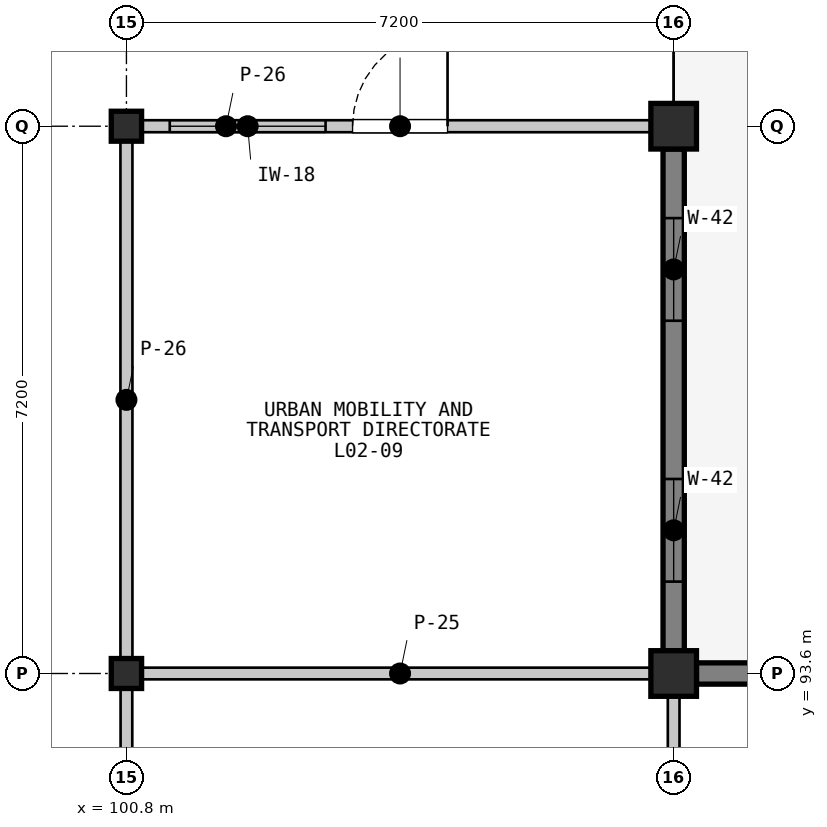
"""IFC4 building model, lengths in metres.
Left out: names, types, materials, properties, quantities, classifications, styles, units other than length and angle.
Written with IfcOpenShell. Run it as: python <this file> out.ifc"""

import sys

from ifc_helpers import new_model, si_unit, direction, frame, frame_2d, origin, origin_2d, place, context, subcontext, project, spatial, rectangle, i_section, extrude, element, fill, save


model = new_model("IFC4")
c1 = context("Model", 3, precision=1e-05, world=origin(), true_north=direction((0.0, 1.0)))
c2 = subcontext(c1, "Body", "Model", "MODEL_VIEW")
j1 = project(units=[si_unit("LENGTHUNIT", "METRE"), si_unit("PLANEANGLEUNIT", "RADIAN")], contexts=[c1])
p1 = place(None, origin())
s1 = spatial("IfcSite", under=j1, at=p1, CompositionType="ELEMENT")
p2 = place(p1, origin())
s2 = spatial("IfcBuilding", under=s1, at=p2, CompositionType="ELEMENT")
p3 = place(p2, frame((0.0, 0.0, 5.4)))
s3 = spatial("IfcBuildingStorey", under=s2, at=p3, CompositionType="ELEMENT", Elevation=5.4)
for number, where, z_axis, x_axis in (
    (1, (100.8, 93.6, 0.0), (0.0, 0.0, 1.0), (1.0, 0.0, 0.0)),
    (2, (100.8, 100.8, 0.0), (0.0, 0.0, 1.0), (1.0, 0.0, 0.0)),
):
    element("IfcColumn", number, at=place(p3, frame(where, z_axis=z_axis, x_axis=x_axis)), inside=s3, PredefinedType="COLUMN", context=c2, shape_type="SweptSolid", body=[
        extrude(i_section(OverallWidth=0.399, OverallDepth=0.394, WebThickness=0.023, FlangeThickness=0.037, FilletRadius=0.015, at=origin_2d()), origin(), (0.0, 0.0, 1.0), 4.5),
    ])
for number, where, z_axis, x_axis in (
    (3, (108.0, 93.6, 0.0), (0.0, 0.0, 1.0), (1.0, 0.0, 0.0)),
    (4, (108.0, 100.8, 0.0), (0.0, 0.0, 1.0), (1.0, 0.0, 0.0)),
):
    element("IfcColumn", number, at=place(p3, frame(where, z_axis=z_axis, x_axis=x_axis)), inside=s3, PredefinedType="COLUMN", context=c2, shape_type="SweptSolid", body=[
        extrude(rectangle(XDim=0.6, YDim=0.6, at=origin_2d()), origin(), (0.0, 0.0, 1.0), 4.5),
    ])
p4 = place(p3, frame((108.0, 100.5, 0.0), z_axis=(0.0, 0.0, 1.0), x_axis=(0.0, -1.0, 0.0)))
e5 = element("IfcWall", 5, at=p4, inside=s3, PredefinedType="SOLIDWALL", context=c2, shape_type="SweptSolid", body=[
    extrude(rectangle(XDim=6.6, YDim=0.28, at=frame_2d((3.3, 0.0))), origin(), (0.0, 0.0, 1.0), 3.767),
])
p5 = place(p4, frame((0.909, 0.0, 0.95)))
e6 = element("IfcOpeningElement", 6, at=p5, cuts=e5, PredefinedType="OPENING", context=c2, shape_type="SweptSolid", body=[
    extrude(rectangle(XDim=1.35, YDim=1.85, at=frame_2d((0.675, 0.925))), frame((0.0, 0.15, 0.0), z_axis=(0.0, -1.0, 0.0), x_axis=(1.0, 0.0, 0.0)), (0.0, 0.0, 1.0), 0.3),
])
p6 = place(p4, frame((4.341, 0.0, 0.95)))
e7 = element("IfcOpeningElement", 7, at=p6, cuts=e5, PredefinedType="OPENING", context=c2, shape_type="SweptSolid", body=[
    extrude(rectangle(XDim=1.35, YDim=1.85, at=frame_2d((0.675, 0.925))), frame((0.0, 0.15, 0.0), z_axis=(0.0, -1.0, 0.0), x_axis=(1.0, 0.0, 0.0)), (0.0, 0.0, 1.0), 0.3),
])
p7 = place(p3, frame((108.3, 93.6, 0.0), z_axis=(0.0, 0.0, 1.0), x_axis=(1.0, 0.0, 0.0)))
e8 = element("IfcWall", 8, at=p7, inside=s3, PredefinedType="SOLIDWALL", context=c2, shape_type="SweptSolid", body=[
    extrude(rectangle(XDim=6.65, YDim=0.28, at=frame_2d((3.325, 0.0))), origin(), (0.0, 0.0, 1.0), 3.698),
])
for number, where, z_axis, x_axis in (
    (9, (100.92, 93.6, 0.0), (0.0, 0.0, 1.0), (1.0, 0.0, 0.0)),
    (10, (100.8, 86.52, 0.0), (0.0, 0.0, 1.0), (0.0, 1.0, 0.0)),
    (11, (108.0, 93.48, 0.0), (0.0, 0.0, 1.0), (0.0, -1.0, 0.0)),
):
    element("IfcWall", number, at=place(p3, frame(where, z_axis=z_axis, x_axis=x_axis)), inside=s3, PredefinedType="PARTITIONING", context=c2, shape_type="SweptSolid", body=[
        extrude(rectangle(XDim=6.96, YDim=0.154, at=frame_2d((3.48, 0.0))), origin(), (0.0, 0.0, 1.0), 3.688),
    ])
p8 = place(p3, frame((100.92, 100.8, 0.0), z_axis=(0.0, 0.0, 1.0), x_axis=(1.0, 0.0, 0.0)))
e12 = element("IfcWall", 12, at=p8, inside=s3, PredefinedType="PARTITIONING", context=c2, shape_type="SweptSolid", body=[
    extrude(rectangle(XDim=6.96, YDim=0.158, at=frame_2d((3.48, 0.0))), origin(), (0.0, 0.0, 1.0), 3.688),
])
p9 = place(p8, frame((2.855, 0.0, 0.0)))
e13 = element("IfcOpeningElement", 13, at=p9, cuts=e12, PredefinedType="OPENING", context=c2, shape_type="SweptSolid", body=[
    extrude(rectangle(XDim=1.25, YDim=2.2, at=frame_2d((0.625, 1.1))), frame((0.0, 0.089, 0.0), z_axis=(0.0, -1.0, 0.0), x_axis=(1.0, 0.0, 0.0)), (0.0, 0.0, 1.0), 0.178),
])
p10 = place(p8, frame((0.45, 0.0, 1.05)))
e14 = element("IfcOpeningElement", 14, at=p10, cuts=e12, PredefinedType="OPENING", context=c2, shape_type="SweptSolid", body=[
    extrude(rectangle(XDim=2.05, YDim=1.22, at=frame_2d((1.025, 0.61))), frame((0.0, 0.089, 0.0), z_axis=(0.0, -1.0, 0.0), x_axis=(1.0, 0.0, 0.0)), (0.0, 0.0, 1.0), 0.178),
])
p11 = place(p3, frame((100.8, 93.72, 0.0), z_axis=(0.0, 0.0, 1.0), x_axis=(0.0, 1.0, 0.0)))
e15 = element("IfcWall", 15, at=p11, inside=s3, PredefinedType="PARTITIONING", context=c2, shape_type="SweptSolid", body=[
    extrude(rectangle(XDim=6.96, YDim=0.158, at=frame_2d((3.48, 0.0))), origin(), (0.0, 0.0, 1.0), 3.688),
])
p12 = place(p5, origin())
e16 = element("IfcWindow", 16, at=p12, inside=s3, PartitioningType="SINGLE_PANEL", PredefinedType="WINDOW", context=c2, shape_type="SweptSolid", body=[
    extrude(rectangle(XDim=1.35, YDim=1.85, at=frame_2d((0.675, 0.925))), frame((0.0, 0.03, 0.0), z_axis=(0.0, -1.0, 0.0), x_axis=(1.0, 0.0, 0.0)), (0.0, 0.0, 1.0), 0.06),
])
fill(e6, e16)
p13 = place(p6, origin())
e17 = element("IfcWindow", 17, at=p13, inside=s3, PartitioningType="SINGLE_PANEL", PredefinedType="WINDOW", context=c2, shape_type="SweptSolid", body=[
    extrude(rectangle(XDim=1.35, YDim=1.85, at=frame_2d((0.675, 0.925))), frame((0.0, 0.03, 0.0), z_axis=(0.0, -1.0, 0.0), x_axis=(1.0, 0.0, 0.0)), (0.0, 0.0, 1.0), 0.06),
])
fill(e7, e17)
p14 = place(p9, origin())
e18 = element("IfcDoor", 18, at=p14, inside=s3, OperationType="SINGLE_SWING_RIGHT", PredefinedType="DOOR", context=c2, shape_type="SweptSolid", body=[
    extrude(rectangle(XDim=1.25, YDim=2.2, at=frame_2d((0.625, 1.1))), frame((0.0, 0.025, 0.0), z_axis=(0.0, -1.0, 0.0), x_axis=(1.0, 0.0, 0.0)), (0.0, 0.0, 1.0), 0.05),
])
fill(e13, e18)
p15 = place(p10, origin())
e19 = element("IfcWindow", 19, at=p15, inside=s3, PartitioningType="SINGLE_PANEL", PredefinedType="WINDOW", context=c2, shape_type="SweptSolid", body=[
    extrude(rectangle(XDim=2.05, YDim=1.22, at=frame_2d((1.025, 0.61))), frame((0.0, 0.03, 0.0), z_axis=(0.0, -1.0, 0.0), x_axis=(1.0, 0.0, 0.0)), (0.0, 0.0, 1.0), 0.06),
])
fill(e14, e19)
save(model, sys.argv[1])
